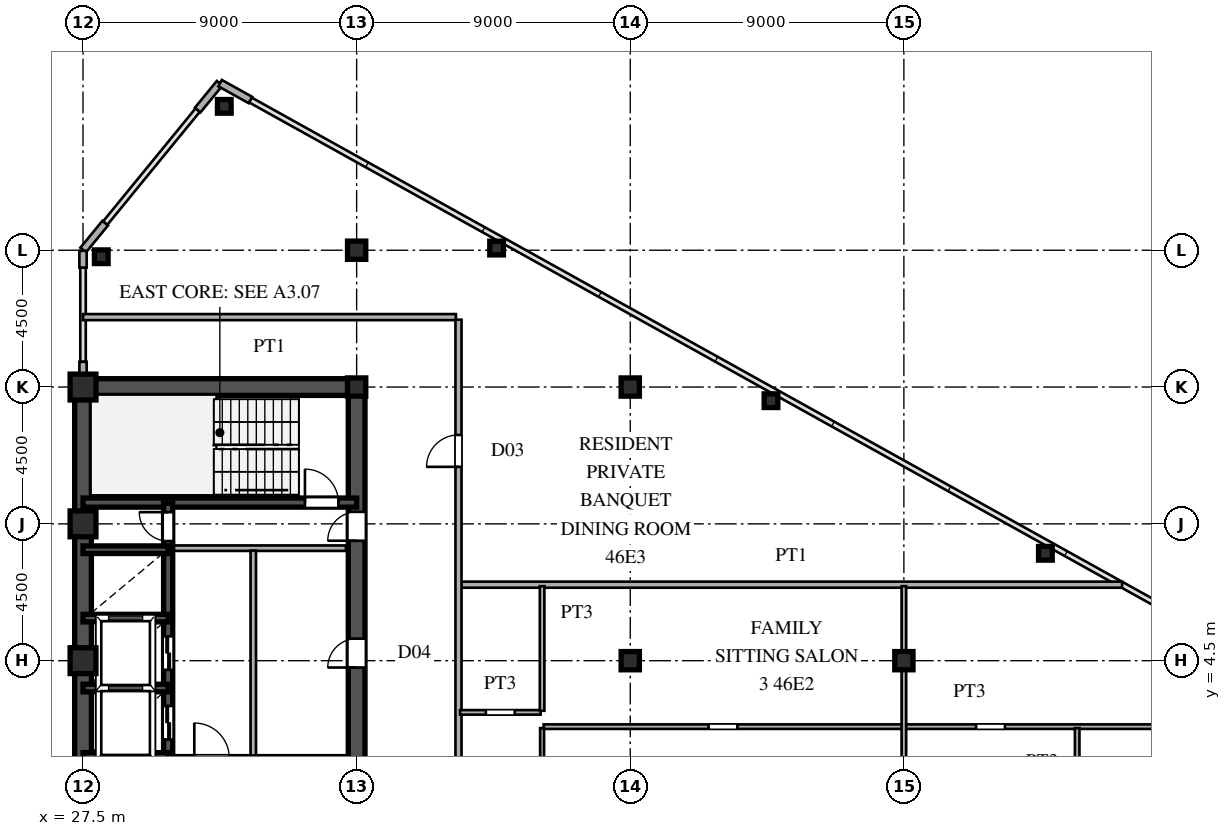
"""IFC4 building model, lengths in metres.
Left out: names, types, materials, properties, quantities, classifications, styles, units other than length and angle.
Written with IfcOpenShell. Run it as: python <this file> out.ifc"""

import sys

from ifc_helpers import new_model, si_unit, direction, frame, frame_2d, origin, origin_2d, place, context, subcontext, project, spatial, rectangle, hollow_rectangle, i_section, extrude, source, transform, mapped, element, fill, save


model = new_model("IFC4")
c1 = context("Model", 3, precision=1e-05, world=origin(), true_north=direction((0.0, 1.0)))
c2 = subcontext(c1, "Body", "Model", "MODEL_VIEW")
j1 = project(units=[si_unit("LENGTHUNIT", "METRE"), si_unit("PLANEANGLEUNIT", "RADIAN")], contexts=[c1])
p1 = place(None, origin())
s1 = spatial("IfcSite", under=j1, at=p1, CompositionType="ELEMENT")
p2 = place(p1, origin())
s2 = spatial("IfcBuilding", under=s1, at=p2, CompositionType="ELEMENT")
p3 = place(p2, frame((0.0, 0.0, 174.3)))
s3 = spatial("IfcBuildingStorey", under=s2, at=p3, CompositionType="ELEMENT", Elevation=174.3)
m1 = source(origin(), c2, "Body", "SweptSolid", [
    extrude(hollow_rectangle(XDim=0.85, YDim=0.85, WallThickness=0.036, at=origin_2d()), origin(), (0.0, 0.0, 1.0), 3.6),
])
for number, where, z_axis, x_axis in (
    (1, (27.5, 4.5, 0.0), (0.0, 0.0, 1.0), (1.0, 0.0, 0.0)),
    (2, (27.5, 9.0, 0.0), (0.0, 0.0, 1.0), (1.0, 0.0, 0.0)),
    (3, (27.5, 13.5, 0.0), (0.0, 0.0, 1.0), (1.0, 0.0, 0.0)),
):
    element("IfcColumn", number, at=place(p3, frame(where, z_axis=z_axis, x_axis=x_axis)), inside=s3, PredefinedType="COLUMN", context=c2, shape_type="MappedRepresentation", body=[
        mapped(m1, transform((0.0, 0.0, 0.0), scale=1.0)),
    ])
m2 = source(origin(), c2, "Body", "SweptSolid", [
    extrude(i_section(OverallWidth=0.6, OverallDepth=0.6, WebThickness=0.025, FlangeThickness=0.04, at=origin_2d()), origin(), (0.0, 0.0, 1.0), 3.6),
])
for number, where, z_axis, x_axis in (
    (4, (36.5, 13.5, 0.0), (0.0, 0.0, 1.0), (1.0, 0.0, 0.0)),
    (5, (36.5, 18.0, 0.0), (0.0, 0.0, 1.0), (1.0, 0.0, 0.0)),
    (6, (45.5, 4.5, 0.0), (0.0, 0.0, 1.0), (1.0, 0.0, 0.0)),
    (7, (45.5, 13.5, 0.0), (0.0, 0.0, 1.0), (1.0, 0.0, 0.0)),
    (8, (54.5, 4.5, 0.0), (0.0, 0.0, 1.0), (1.0, 0.0, 0.0)),
):
    element("IfcColumn", number, at=place(p3, frame(where, z_axis=z_axis, x_axis=x_axis)), inside=s3, PredefinedType="COLUMN", context=c2, shape_type="MappedRepresentation", body=[
        mapped(m2, transform((0.0, 0.0, 0.0), scale=1.0)),
    ])
m3 = source(origin(), c2, "Body", "SweptSolid", [
    extrude(hollow_rectangle(XDim=0.45, YDim=0.45, WallThickness=0.018, at=origin_2d()), origin(), (0.0, 0.0, 1.0), 3.6),
])
for number, where, z_axis, x_axis in (
    (9, (32.147, 22.732, 0.0), (0.0, 0.0, 1.0), (1.0, 0.0, 0.0)),
    (10, (28.1, 17.786, 0.0), (0.0, 0.0, 1.0), (1.0, 0.0, 0.0)),
    (11, (41.104, 18.071, 0.0), (0.0, 0.0, 1.0), (1.0, 0.0, 0.0)),
    (12, (50.129, 13.051, 0.0), (0.0, 0.0, 1.0), (1.0, 0.0, 0.0)),
    (13, (59.155, 8.031, 0.0), (0.0, 0.0, 1.0), (1.0, 0.0, 0.0)),
):
    element("IfcColumn", number, at=place(p3, frame(where, z_axis=z_axis, x_axis=x_axis)), inside=s3, PredefinedType="COLUMN", context=c2, shape_type="MappedRepresentation", body=[
        mapped(m3, transform((0.0, 0.0, 0.0), scale=1.0)),
    ])
p4 = place(p3, frame((33.005, 22.941, 0.0), z_axis=(0.0, 0.0, 1.0), x_axis=(-0.87385402111, 0.486188389196, 0.0)))
e14 = element("IfcWall", 14, at=p4, inside=s3, PredefinedType="SOLIDWALL", context=c2, shape_type="SweptSolid", body=[
    extrude(rectangle(XDim=1.14, YDim=0.24, at=frame_2d((0.57, 0.0))), origin(), (0.0, 0.0, 1.0), 3.38),
])
for number, where, z_axis, x_axis in (
    (15, (31.994, 23.492, 0.0), (0.0, 0.0, 1.0), (-0.633, -0.774, 0.0)),
    (16, (28.228, 18.89, 0.0), (0.0, 0.0, 1.0), (-0.633, -0.774, 0.0)),
):
    element("IfcWall", number, at=place(p3, frame(where, z_axis=z_axis, x_axis=x_axis)), inside=s3, PredefinedType="SOLIDWALL", context=c2, shape_type="SweptSolid", body=[
        extrude(rectangle(XDim=1.14, YDim=0.24, at=frame_2d((0.57, 0.0))), origin(), (0.0, 0.0, 1.0), 3.38),
    ])
p5 = place(p3, frame((27.5, 13.78, 0.0), z_axis=(0.0, 0.0, 1.0), x_axis=(0.0, 1.0, 0.0)))
e17 = element("IfcWall", 17, at=p5, inside=s3, PredefinedType="SOLIDWALL", context=c2, shape_type="SweptSolid", body=[
    extrude(rectangle(XDim=0.55, YDim=0.24, at=frame_2d((0.275, 0.0))), origin(), (0.0, 0.0, 1.0), 2.88),
])
p6 = place(p3, frame((27.5, 17.43, 0.0), z_axis=(0.0, 0.0, 1.0), x_axis=(0.0, 1.0, 0.0)))
e18 = element("IfcWall", 18, at=p6, inside=s3, PredefinedType="SOLIDWALL", context=c2, shape_type="SweptSolid", body=[
    extrude(rectangle(XDim=0.55, YDim=0.24, at=frame_2d((0.275, 0.0))), origin(), (0.0, 0.0, 1.0), 3.38),
])
p7 = place(p3, frame((27.5, 1.3, 0.0), z_axis=(0.0, 0.0, 1.0), x_axis=(0.0, 1.0, 0.0)))
e19 = element("IfcWall", 19, at=p7, inside=s3, PredefinedType="SHEAR", context=c2, shape_type="SweptSolid", body=[
    extrude(rectangle(XDim=12.2, YDim=0.55, at=frame_2d((6.1, 0.0))), origin(), (0.0, 0.0, 1.0), 3.38),
])
p8 = place(p3, frame((27.5, 13.5, 0.0), z_axis=(0.0, 0.0, 1.0), x_axis=(1.0, 0.0, 0.0)))
e20 = element("IfcWall", 20, at=p8, inside=s3, PredefinedType="SHEAR", context=c2, shape_type="SweptSolid", body=[
    extrude(rectangle(XDim=9.0, YDim=0.55, at=frame_2d((4.5, 0.0))), origin(), (0.0, 0.0, 1.0), 3.38),
])
p9 = place(p3, frame((36.5, 8.2, 0.0), z_axis=(0.0, 0.0, 1.0), x_axis=(0.0, 1.0, 0.0)))
e21 = element("IfcWall", 21, at=p9, inside=s3, PredefinedType="SHEAR", context=c2, shape_type="SweptSolid", body=[
    extrude(rectangle(XDim=5.45, YDim=0.55, at=frame_2d((2.725, 0.0))), origin(), (0.0, 0.0, 1.0), 3.38),
])
p10 = place(p9, frame((0.245, 0.0, 0.0)))
e22 = element("IfcOpeningElement", 22, at=p10, cuts=e21, PredefinedType="OPENING", context=c2, shape_type="SweptSolid", body=[
    extrude(rectangle(XDim=0.95, YDim=2.15, at=frame_2d((0.475, 1.075))), frame((0.0, 0.285, 0.0), z_axis=(0.0, -1.0, 0.0), x_axis=(1.0, 0.0, 0.0)), (0.0, 0.0, 1.0), 0.57),
])
p11 = place(p3, frame((36.5, 1.3, 0.0), z_axis=(0.0, 0.0, 1.0), x_axis=(0.0, 1.0, 0.0)))
e23 = element("IfcWall", 23, at=p11, inside=s3, PredefinedType="SHEAR", context=c2, shape_type="SweptSolid", body=[
    extrude(rectangle(XDim=6.9, YDim=0.55, at=frame_2d((3.45, 0.0))), origin(), (0.0, 0.0, 1.0), 3.38),
])
p12 = place(p11, frame((2.975, 0.0, 0.0)))
e24 = element("IfcOpeningElement", 24, at=p12, cuts=e23, PredefinedType="OPENING", context=c2, shape_type="SweptSolid", body=[
    extrude(rectangle(XDim=0.95, YDim=2.15, at=frame_2d((0.475, 1.075))), frame((0.0, 0.285, 0.0), z_axis=(0.0, -1.0, 0.0), x_axis=(1.0, 0.0, 0.0)), (0.0, 0.0, 1.0), 0.57),
])
p13 = place(p3, frame((27.5, 9.7, 0.0), z_axis=(0.0, 0.0, 1.0), x_axis=(1.0, 0.0, 0.0)))
e25 = element("IfcWall", 25, at=p13, inside=s3, PredefinedType="SHEAR", context=c2, shape_type="SweptSolid", body=[
    extrude(rectangle(XDim=9.0, YDim=0.3, at=frame_2d((4.5, 0.0))), origin(), (0.0, 0.0, 1.0), 3.38),
])
p14 = place(p13, frame((7.3, 0.0, 0.0)))
e26 = element("IfcOpeningElement", 26, at=p14, cuts=e25, PredefinedType="OPENING", context=c2, shape_type="SweptSolid", body=[
    extrude(rectangle(XDim=1.1, YDim=2.2, at=frame_2d((0.55, 1.1))), frame((0.0, 0.16, 0.0), z_axis=(0.0, -1.0, 0.0), x_axis=(1.0, 0.0, 0.0)), (0.0, 0.0, 1.0), 0.32),
])
for number, where, z_axis, x_axis in (
    (27, (27.5, 1.35, 0.0), (0.0, 0.0, 1.0), (1.0, 0.0, 0.0)),
    (28, (27.5, 3.6, 0.0), (0.0, 0.0, 1.0), (1.0, 0.0, 0.0)),
    (29, (27.5, 5.9, 0.0), (0.0, 0.0, 1.0), (1.0, 0.0, 0.0)),
    (30, (27.5, 8.15, 0.0), (0.0, 0.0, 1.0), (1.0, 0.0, 0.0)),
):
    element("IfcWall", number, at=place(p3, frame(where, z_axis=z_axis, x_axis=x_axis)), inside=s3, PredefinedType="SHEAR", context=c2, shape_type="SweptSolid", body=[
        extrude(rectangle(XDim=2.8, YDim=0.25, at=frame_2d((1.4, 0.0))), origin(), (0.0, 0.0, 1.0), 3.38),
    ])
p15 = place(p3, frame((30.3, 1.32, 0.0), z_axis=(0.0, 0.0, 1.0), x_axis=(0.0, 1.0, 0.0)))
e31 = element("IfcWall", 31, at=p15, inside=s3, PredefinedType="SHEAR", context=c2, shape_type="SweptSolid", body=[
    extrude(rectangle(XDim=2.28, YDim=0.3, at=frame_2d((1.14, 0.0))), origin(), (0.0, 0.0, 1.0), 3.38),
])
p16 = place(p15, frame((0.59, 0.0, 0.0)))
e32 = element("IfcOpeningElement", 32, at=p16, cuts=e31, PredefinedType="OPENING", context=c2, shape_type="SweptSolid", body=[
    extrude(rectangle(XDim=1.1, YDim=2.2, at=frame_2d((0.55, 1.1))), frame((0.0, 0.16, 0.0), z_axis=(0.0, -1.0, 0.0), x_axis=(1.0, 0.0, 0.0)), (0.0, 0.0, 1.0), 0.32),
])
p17 = place(p3, frame((30.3, 3.6, 0.0), z_axis=(0.0, 0.0, 1.0), x_axis=(0.0, 1.0, 0.0)))
e33 = element("IfcWall", 33, at=p17, inside=s3, PredefinedType="SHEAR", context=c2, shape_type="SweptSolid", body=[
    extrude(rectangle(XDim=2.3, YDim=0.3, at=frame_2d((1.15, 0.0))), origin(), (0.0, 0.0, 1.0), 3.38),
])
p18 = place(p17, frame((0.6, 0.0, 0.0)))
e34 = element("IfcOpeningElement", 34, at=p18, cuts=e33, PredefinedType="OPENING", context=c2, shape_type="SweptSolid", body=[
    extrude(rectangle(XDim=1.1, YDim=2.2, at=frame_2d((0.55, 1.1))), frame((0.0, 0.16, 0.0), z_axis=(0.0, -1.0, 0.0), x_axis=(1.0, 0.0, 0.0)), (0.0, 0.0, 1.0), 0.32),
])
p19 = place(p3, frame((30.3, 5.9, 0.0), z_axis=(0.0, 0.0, 1.0), x_axis=(0.0, 1.0, 0.0)))
e35 = element("IfcWall", 35, at=p19, inside=s3, PredefinedType="SHEAR", context=c2, shape_type="SweptSolid", body=[
    extrude(rectangle(XDim=2.25, YDim=0.3, at=frame_2d((1.125, 0.0))), origin(), (0.0, 0.0, 1.0), 3.38),
])
p20 = place(p3, frame((30.3, 8.15, 0.0), z_axis=(0.0, 0.0, 1.0), x_axis=(0.0, 1.0, 0.0)))
e36 = element("IfcWall", 36, at=p20, inside=s3, PredefinedType="SHEAR", context=c2, shape_type="SweptSolid", body=[
    extrude(rectangle(XDim=1.53, YDim=0.3, at=frame_2d((0.765, 0.0))), origin(), (0.0, 0.0, 1.0), 3.38),
])
p21 = place(p20, frame((0.285, 0.0, 0.0)))
e37 = element("IfcOpeningElement", 37, at=p21, cuts=e36, PredefinedType="OPENING", context=c2, shape_type="SweptSolid", body=[
    extrude(rectangle(XDim=0.95, YDim=2.15, at=frame_2d((0.475, 1.075))), frame((0.0, 0.16, 0.0), z_axis=(0.0, -1.0, 0.0), x_axis=(1.0, 0.0, 0.0)), (0.0, 0.0, 1.0), 0.32),
])
p22 = place(p3, frame((30.45, 8.2, 0.0), z_axis=(0.0, 0.0, 1.0), x_axis=(1.0, 0.0, 0.0)))
e38 = element("IfcWall", 38, at=p22, inside=s3, PredefinedType="PARTITIONING", context=c2, shape_type="SweptSolid", body=[
    extrude(rectangle(XDim=5.7, YDim=0.18, at=frame_2d((2.85, 0.0))), origin(), (0.0, 0.0, 1.0), 3.38),
])
p23 = place(p3, frame((33.1, 1.38, 0.0), z_axis=(0.0, 0.0, 1.0), x_axis=(0.0, 1.0, 0.0)))
e39 = element("IfcWall", 39, at=p23, inside=s3, PredefinedType="PARTITIONING", context=c2, shape_type="SweptSolid", body=[
    extrude(rectangle(XDim=6.74, YDim=0.18, at=frame_2d((3.37, 0.0))), origin(), (0.0, 0.0, 1.0), 3.38),
])
p24 = place(p3, frame((30.45, 1.3, 0.0), z_axis=(0.0, 0.0, 1.0), x_axis=(1.0, 0.0, 0.0)))
e40 = element("IfcWall", 40, at=p24, inside=s3, PredefinedType="PARTITIONING", context=c2, shape_type="SweptSolid", body=[
    extrude(rectangle(XDim=2.57, YDim=0.18, at=frame_2d((1.285, 0.0))), origin(), (0.0, 0.0, 1.0), 3.38),
])
p25 = place(p24, frame((0.71, 0.0, 0.0)))
e41 = element("IfcOpeningElement", 41, at=p25, cuts=e40, PredefinedType="OPENING", context=c2, shape_type="SweptSolid", body=[
    extrude(rectangle(XDim=1.15, YDim=2.2, at=frame_2d((0.575, 1.1))), frame((0.0, 0.1, 0.0), z_axis=(0.0, -1.0, 0.0), x_axis=(1.0, 0.0, 0.0)), (0.0, 0.0, 1.0), 0.2),
])
p26 = place(p3, frame((33.2, 1.3, 0.0), z_axis=(0.0, 0.0, 1.0), x_axis=(1.0, 0.0, 0.0)))
e42 = element("IfcWall", 42, at=p26, inside=s3, PredefinedType="PARTITIONING", context=c2, shape_type="SweptSolid", body=[
    extrude(rectangle(XDim=2.95, YDim=0.18, at=frame_2d((1.475, 0.0))), origin(), (0.0, 0.0, 1.0), 3.38),
])
p27 = place(p3, frame((42.65, 2.33, 0.0), z_axis=(0.0, 0.0, 1.0), x_axis=(1.0, 0.0, 0.0)))
e43 = element("IfcWall", 43, at=p27, inside=s3, PredefinedType="PARTITIONING", context=c2, shape_type="SweptSolid", body=[
    extrude(rectangle(XDim=25.725, YDim=0.15, at=frame_2d((12.863, 0.0))), origin(), (0.0, 0.0, 1.0), 3.38),
])
p28 = place(p27, frame((5.425, 0.0, 0.0)))
e44 = element("IfcOpeningElement", 44, at=p28, cuts=e43, PredefinedType="OPENING", context=c2, shape_type="SweptSolid", body=[
    extrude(rectangle(XDim=0.95, YDim=2.15, at=frame_2d((0.475, 1.075))), frame((0.0, 0.085, 0.0), z_axis=(0.0, -1.0, 0.0), x_axis=(1.0, 0.0, 0.0)), (0.0, 0.0, 1.0), 0.17),
])
p29 = place(p27, frame((14.225, 0.0, 0.0)))
e45 = element("IfcOpeningElement", 45, at=p29, cuts=e43, PredefinedType="OPENING", context=c2, shape_type="SweptSolid", body=[
    extrude(rectangle(XDim=0.95, YDim=2.15, at=frame_2d((0.475, 1.075))), frame((0.0, 0.085, 0.0), z_axis=(0.0, -1.0, 0.0), x_axis=(1.0, 0.0, 0.0)), (0.0, 0.0, 1.0), 0.17),
])
p30 = place(p3, frame((39.9, 2.8, 0.0), z_axis=(0.0, 0.0, 1.0), x_axis=(1.0, 0.0, 0.0)))
e46 = element("IfcWall", 46, at=p30, inside=s3, PredefinedType="PARTITIONING", context=c2, shape_type="SweptSolid", body=[
    extrude(rectangle(XDim=2.65, YDim=0.15, at=frame_2d((1.325, 0.0))), origin(), (0.0, 0.0, 1.0), 3.38),
])
p31 = place(p30, frame((0.85, 0.0, 0.0)))
e47 = element("IfcOpeningElement", 47, at=p31, cuts=e46, PredefinedType="OPENING", context=c2, shape_type="SweptSolid", body=[
    extrude(rectangle(XDim=0.95, YDim=2.15, at=frame_2d((0.475, 1.075))), frame((0.0, 0.085, 0.0), z_axis=(0.0, -1.0, 0.0), x_axis=(1.0, 0.0, 0.0)), (0.0, 0.0, 1.0), 0.17),
])
p32 = place(p3, frame((39.93, 7.0, 0.0), z_axis=(0.0, 0.0, 1.0), x_axis=(1.0, 0.0, 0.0)))
e48 = element("IfcWall", 48, at=p32, inside=s3, PredefinedType="PARTITIONING", context=c2, shape_type="SweptSolid", body=[
    extrude(rectangle(XDim=21.748, YDim=0.2, at=frame_2d((10.874, 0.0))), origin(), (0.0, 0.0, 1.0), 3.38),
])
p33 = place(p3, frame((27.5, 15.8, 0.0), z_axis=(0.0, 0.0, 1.0), x_axis=(1.0, 0.0, 0.0)))
e49 = element("IfcWall", 49, at=p33, inside=s3, PredefinedType="PARTITIONING", context=c2, shape_type="SweptSolid", body=[
    extrude(rectangle(XDim=12.265, YDim=0.2, at=frame_2d((6.132, 0.0))), origin(), (0.0, 0.0, 1.0), 3.38),
])
p34 = place(p3, frame((39.85, -15.715, 0.0), z_axis=(0.0, 0.0, 1.0), x_axis=(0.0, 1.0, 0.0)))
e50 = element("IfcWall", 50, at=p34, inside=s3, PredefinedType="PARTITIONING", context=c2, shape_type="SweptSolid", body=[
    extrude(rectangle(XDim=31.43, YDim=0.2, at=frame_2d((15.715, 0.0))), origin(), (0.0, 0.0, 1.0), 3.38),
])
p35 = place(p34, frame((6.792, 0.0, 0.0)))
e51 = element("IfcOpeningElement", 51, at=p35, cuts=e50, PredefinedType="OPENING", context=c2, shape_type="SweptSolid", body=[
    extrude(rectangle(XDim=1.05, YDim=2.25, at=frame_2d((0.525, 1.125))), frame((0.0, 0.11, 0.0), z_axis=(0.0, -1.0, 0.0), x_axis=(1.0, 0.0, 0.0)), (0.0, 0.0, 1.0), 0.22),
])
p36 = place(p34, frame((14.98, 0.0, 0.0)))
e52 = element("IfcOpeningElement", 52, at=p36, cuts=e50, PredefinedType="OPENING", context=c2, shape_type="SweptSolid", body=[
    extrude(rectangle(XDim=1.05, YDim=2.25, at=frame_2d((0.525, 1.125))), frame((0.0, 0.11, 0.0), z_axis=(0.0, -1.0, 0.0), x_axis=(1.0, 0.0, 0.0)), (0.0, 0.0, 1.0), 0.22),
])
p37 = place(p34, frame((26.59, 0.0, 0.0)))
e53 = element("IfcOpeningElement", 53, at=p37, cuts=e50, PredefinedType="OPENING", context=c2, shape_type="SweptSolid", body=[
    extrude(rectangle(XDim=1.05, YDim=2.25, at=frame_2d((0.525, 1.125))), frame((0.0, 0.11, 0.0), z_axis=(0.0, -1.0, 0.0), x_axis=(1.0, 0.0, 0.0)), (0.0, 0.0, 1.0), 0.22),
])
p38 = place(p3, frame((42.6, -9.745, 0.0), z_axis=(0.0, 0.0, 1.0), x_axis=(0.0, 1.0, 0.0)))
e54 = element("IfcWall", 54, at=p38, inside=s3, PredefinedType="PARTITIONING", context=c2, shape_type="SweptSolid", body=[
    extrude(rectangle(XDim=12.028, YDim=0.13, at=frame_2d((6.014, 0.0))), origin(), (0.0, 0.0, 1.0), 3.38),
])
p39 = place(p38, frame((0.873, 0.0, 0.0)))
e55 = element("IfcOpeningElement", 55, at=p39, cuts=e54, PredefinedType="OPENING", context=c2, shape_type="SweptSolid", body=[
    extrude(rectangle(XDim=0.95, YDim=2.15, at=frame_2d((0.475, 1.075))), frame((0.0, 0.075, 0.0), z_axis=(0.0, -1.0, 0.0), x_axis=(1.0, 0.0, 0.0)), (0.0, 0.0, 1.0), 0.15),
])
p40 = place(p38, frame((9.27, 0.0, 0.0)))
e56 = element("IfcOpeningElement", 56, at=p40, cuts=e54, PredefinedType="OPENING", context=c2, shape_type="SweptSolid", body=[
    extrude(rectangle(XDim=0.95, YDim=2.15, at=frame_2d((0.475, 1.075))), frame((0.0, 0.075, 0.0), z_axis=(0.0, -1.0, 0.0), x_axis=(1.0, 0.0, 0.0)), (0.0, 0.0, 1.0), 0.15),
])
p41 = place(p3, frame((42.6, 2.852, 0.0), z_axis=(0.0, 0.0, 1.0), x_axis=(0.0, 1.0, 0.0)))
e57 = element("IfcWall", 57, at=p41, inside=s3, PredefinedType="PARTITIONING", context=c2, shape_type="SweptSolid", body=[
    extrude(rectangle(XDim=4.098, YDim=0.15, at=frame_2d((2.049, 0.0))), origin(), (0.0, 0.0, 1.0), 3.38),
])
p42 = place(p3, frame((54.5, -10.485, 0.0), z_axis=(0.0, 0.0, 1.0), x_axis=(0.0, 1.0, 0.0)))
e58 = element("IfcWall", 58, at=p42, inside=s3, PredefinedType="PARTITIONING", context=c2, shape_type="SweptSolid", body=[
    extrude(rectangle(XDim=17.435, YDim=0.15, at=frame_2d((8.718, 0.0))), origin(), (0.0, 0.0, 1.0), 2.78),
])
p43 = place(p42, frame((1.242, 0.0, 0.0)))
e59 = element("IfcOpeningElement", 59, at=p43, cuts=e58, PredefinedType="OPENING", context=c2, shape_type="SweptSolid", body=[
    extrude(rectangle(XDim=0.95, YDim=2.15, at=frame_2d((0.475, 1.075))), frame((0.0, 0.085, 0.0), z_axis=(0.0, -1.0, 0.0), x_axis=(1.0, 0.0, 0.0)), (0.0, 0.0, 1.0), 0.17),
])
p44 = place(p42, frame((10.01, 0.0, 0.0)))
e60 = element("IfcOpeningElement", 60, at=p44, cuts=e58, PredefinedType="OPENING", context=c2, shape_type="SweptSolid", body=[
    extrude(rectangle(XDim=0.95, YDim=2.15, at=frame_2d((0.475, 1.075))), frame((0.0, 0.085, 0.0), z_axis=(0.0, -1.0, 0.0), x_axis=(1.0, 0.0, 0.0)), (0.0, 0.0, 1.0), 0.17),
])
p45 = place(p3, frame((60.2, -2.283, 0.0), z_axis=(0.0, 0.0, 1.0), x_axis=(0.0, 1.0, 0.0)))
e61 = element("IfcWall", 61, at=p45, inside=s3, PredefinedType="PARTITIONING", context=c2, shape_type="SweptSolid", body=[
    extrude(rectangle(XDim=4.566, YDim=0.15, at=frame_2d((2.283, 0.0))), origin(), (0.0, 0.0, 1.0), 3.38),
])
p46 = place(p45, frame((1.808, 0.0, 0.0)))
e62 = element("IfcOpeningElement", 62, at=p46, cuts=e61, PredefinedType="OPENING", context=c2, shape_type="SweptSolid", body=[
    extrude(rectangle(XDim=0.95, YDim=2.15, at=frame_2d((0.475, 1.075))), frame((0.0, 0.085, 0.0), z_axis=(0.0, -1.0, 0.0), x_axis=(1.0, 0.0, 0.0)), (0.0, 0.0, 1.0), 0.17),
])
m4 = source(origin(), c2, "Body", "SweptSolid", [
    extrude(rectangle(XDim=0.95, YDim=2.15, at=frame_2d((0.475, 1.075))), frame((0.0, 0.025, 0.0), z_axis=(0.0, -1.0, 0.0), x_axis=(1.0, 0.0, 0.0)), (0.0, 0.0, 1.0), 0.05),
])
p47 = place(p10, origin())
e63 = element("IfcDoor", 63, at=p47, inside=s3, OperationType="SINGLE_SWING_LEFT", PredefinedType="DOOR", context=c2, shape_type="MappedRepresentation", body=[
    mapped(m4, transform((0.0, 0.0, 0.0), scale=1.0)),
])
fill(e22, e63)
p48 = place(p12, origin())
e64 = element("IfcDoor", 64, at=p48, inside=s3, OperationType="SINGLE_SWING_LEFT", PredefinedType="DOOR", context=c2, shape_type="MappedRepresentation", body=[
    mapped(m4, transform((0.0, 0.0, 0.0), scale=1.0)),
])
fill(e24, e64)
m5 = source(origin(), c2, "Body", "SweptSolid", [
    extrude(rectangle(XDim=1.1, YDim=2.2, at=frame_2d((0.55, 1.1))), frame((0.0, 0.025, 0.0), z_axis=(0.0, -1.0, 0.0), x_axis=(1.0, 0.0, 0.0)), (0.0, 0.0, 1.0), 0.05),
])
p49 = place(p14, origin())
e65 = element("IfcDoor", 65, at=p49, inside=s3, OperationType="SINGLE_SWING_LEFT", PredefinedType="DOOR", context=c2, shape_type="MappedRepresentation", body=[
    mapped(m5, transform((0.0, 0.0, 0.0), scale=1.0)),
])
fill(e26, e65)
m6 = source(origin(), c2, "Body", "SweptSolid", [
    extrude(rectangle(XDim=1.1, YDim=2.2, at=frame_2d((0.55, 1.1))), frame((0.0, 0.025, 0.0), z_axis=(0.0, -1.0, 0.0), x_axis=(1.0, 0.0, 0.0)), (0.0, 0.0, 1.0), 0.05),
])
p50 = place(p16, origin())
e66 = element("IfcDoor", 66, at=p50, inside=s3, OperationType="DOUBLE_DOOR_SLIDING", PredefinedType="DOOR", context=c2, shape_type="MappedRepresentation", body=[
    mapped(m6, transform((0.0, 0.0, 0.0), scale=1.0)),
])
fill(e32, e66)
p51 = place(p18, origin())
e67 = element("IfcDoor", 67, at=p51, inside=s3, OperationType="DOUBLE_DOOR_SLIDING", PredefinedType="DOOR", context=c2, shape_type="MappedRepresentation", body=[
    mapped(m6, transform((0.0, 0.0, 0.0), scale=1.0)),
])
fill(e34, e67)
p52 = place(p21, origin())
e68 = element("IfcDoor", 68, at=p52, inside=s3, OperationType="SINGLE_SWING_RIGHT", PredefinedType="DOOR", context=c2, shape_type="MappedRepresentation", body=[
    mapped(m4, transform((0.0, 0.0, 0.0), scale=1.0)),
])
fill(e37, e68)
m7 = source(origin(), c2, "Body", "SweptSolid", [
    extrude(rectangle(XDim=1.05, YDim=2.25, at=frame_2d((0.525, 1.125))), frame((0.0, 0.025, 0.0), z_axis=(0.0, -1.0, 0.0), x_axis=(1.0, 0.0, 0.0)), (0.0, 0.0, 1.0), 0.05),
])
p53 = place(p37, origin())
e69 = element("IfcDoor", 69, at=p53, inside=s3, OperationType="SINGLE_SWING_LEFT", PredefinedType="DOOR", context=c2, shape_type="MappedRepresentation", body=[
    mapped(m7, transform((0.0, 0.0, 0.0), scale=1.0)),
])
fill(e53, e69)
save(model, sys.argv[1])
